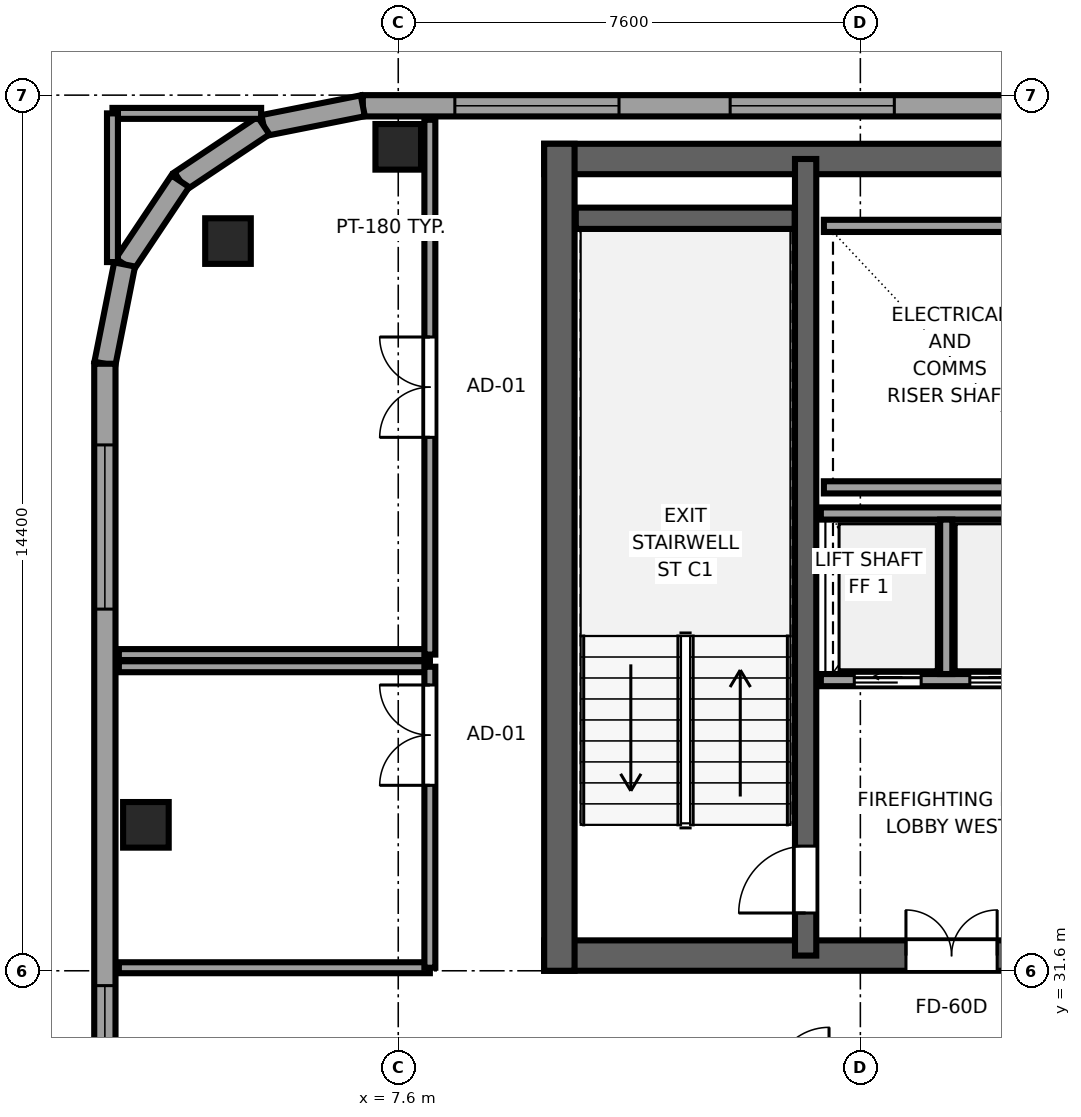
"""IFC4 building model, lengths in metres.
Left out: names, types, materials, properties, quantities, classifications, styles, units other than length and angle.
Written with IfcOpenShell. Run it as: python <this file> out.ifc"""

import sys

from ifc_helpers import new_model, si_unit, direction, frame, frame_2d, origin, origin_2d, place, context, subcontext, project, spatial, rectangle, extrude, source, transform, mapped, element, fill, save


model = new_model("IFC4")
c1 = context("Model", 3, precision=1e-05, world=origin(), true_north=direction((0.0, 1.0)))
c2 = subcontext(c1, "Body", "Model", "MODEL_VIEW")
j1 = project(units=[si_unit("LENGTHUNIT", "METRE"), si_unit("PLANEANGLEUNIT", "RADIAN")], contexts=[c1])
p1 = place(None, origin())
s1 = spatial("IfcSite", under=j1, at=p1, CompositionType="ELEMENT")
p2 = place(p1, origin())
s2 = spatial("IfcBuilding", under=s1, at=p2, CompositionType="ELEMENT")
p3 = place(p2, frame((0.0, 0.0, 234.55)))
s3 = spatial("IfcBuildingStorey", under=s2, at=p3, CompositionType="ELEMENT", Elevation=234.55)
p4 = place(p3, frame((10.0, 31.85, 0.0), z_axis=(0.0, 0.0, 1.0), x_axis=(1.0, 0.0, 0.0)))
e1 = element("IfcWall", 1, at=p4, inside=s3, PredefinedType="SHEAR", context=c2, shape_type="SweptSolid", body=[
    extrude(rectangle(XDim=26.0, YDim=0.5, at=frame_2d((13.0, 0.0))), origin(), (0.0, 0.0, 1.0), 3.55),
])
p5 = place(p4, frame((7.45, 0.0, 0.0), z_axis=(0.0, 0.0, 1.0), x_axis=(-1.0, 0.0, 0.0)))
e2 = element("IfcOpeningElement", 2, at=p5, cuts=e1, PredefinedType="OPENING", context=c2, shape_type="SweptSolid", body=[
    extrude(rectangle(XDim=1.5, YDim=2.04, at=frame_2d((0.75, 1.02))), frame((0.0, 0.26, 0.0), z_axis=(0.0, -1.0, 0.0), x_axis=(1.0, 0.0, 0.0)), (0.0, 0.0, 1.0), 0.52),
])
p6 = place(p4, frame((13.75, 0.0, 0.0), z_axis=(0.0, 0.0, 1.0), x_axis=(-1.0, 0.0, 0.0)))
e3 = element("IfcOpeningElement", 3, at=p6, cuts=e1, PredefinedType="OPENING", context=c2, shape_type="SweptSolid", body=[
    extrude(rectangle(XDim=1.5, YDim=2.04, at=frame_2d((0.75, 1.02))), frame((0.0, 0.26, 0.0), z_axis=(0.0, -1.0, 0.0), x_axis=(1.0, 0.0, 0.0)), (0.0, 0.0, 1.0), 0.52),
])
p7 = place(p4, frame((20.05, 0.0, 0.0), z_axis=(0.0, 0.0, 1.0), x_axis=(-1.0, 0.0, 0.0)))
e4 = element("IfcOpeningElement", 4, at=p7, cuts=e1, PredefinedType="OPENING", context=c2, shape_type="SweptSolid", body=[
    extrude(rectangle(XDim=1.5, YDim=2.04, at=frame_2d((0.75, 1.02))), frame((0.0, 0.26, 0.0), z_axis=(0.0, -1.0, 0.0), x_axis=(1.0, 0.0, 0.0)), (0.0, 0.0, 1.0), 0.52),
])
p8 = place(p3, frame((10.0, 44.95, 0.0), z_axis=(0.0, 0.0, 1.0), x_axis=(1.0, 0.0, 0.0)))
e5 = element("IfcWall", 5, at=p8, inside=s3, PredefinedType="SHEAR", context=c2, shape_type="SweptSolid", body=[
    extrude(rectangle(XDim=26.0, YDim=0.5, at=frame_2d((13.0, 0.0))), origin(), (0.0, 0.0, 1.0), 3.55),
])
p9 = place(p3, frame((10.25, 31.6, 0.0), z_axis=(0.0, 0.0, 1.0), x_axis=(0.0, 1.0, 0.0)))
e6 = element("IfcWall", 6, at=p9, inside=s3, PredefinedType="SHEAR", context=c2, shape_type="SweptSolid", body=[
    extrude(rectangle(XDim=13.6, YDim=0.5, at=frame_2d((6.8, 0.0))), origin(), (0.0, 0.0, 1.0), 3.55),
])
p10 = place(p3, frame((14.3, 31.85, 0.0), z_axis=(0.0, 0.0, 1.0), x_axis=(0.0, 1.0, 0.0)))
e7 = element("IfcWall", 7, at=p10, inside=s3, PredefinedType="SHEAR", context=c2, shape_type="SweptSolid", body=[
    extrude(rectangle(XDim=13.1, YDim=0.35, at=frame_2d((6.55, 0.0))), origin(), (0.0, 0.0, 1.0), 3.55),
])
p11 = place(p10, frame((0.7, 0.0, 0.0)))
e8 = element("IfcOpeningElement", 8, at=p11, cuts=e7, PredefinedType="OPENING", context=c2, shape_type="SweptSolid", body=[
    extrude(rectangle(XDim=1.1, YDim=2.12, at=frame_2d((0.55, 1.06))), frame((0.0, 0.185, 0.0), z_axis=(0.0, -1.0, 0.0), x_axis=(1.0, 0.0, 0.0)), (0.0, 0.0, 1.0), 0.37),
])
p12 = place(p3, frame((10.52, 43.975, 0.0), z_axis=(0.0, 0.0, 1.0), x_axis=(1.0, 0.0, 0.0)))
e9 = element("IfcWall", 9, at=p12, inside=s3, PredefinedType="SHEAR", context=c2, shape_type="SweptSolid", body=[
    extrude(rectangle(XDim=3.6, YDim=0.35, at=frame_2d((1.8, 0.0))), origin(), (0.0, 0.0, 1.0), 3.55),
])
m1 = source(origin(), c2, "Body", "SweptSolid", [
    extrude(rectangle(XDim=0.75, YDim=0.75, at=origin_2d()), origin(), (0.0, 0.0, 1.0), 3.55),
])
for number, where, z_axis, x_axis in (
    (10, (4.8, 43.6, 0.0), (0.0, 0.0, 1.0), (1.0, 0.0, 0.0)),
    (11, (7.6, 45.15, 0.0), (0.0, 0.0, 1.0), (1.0, 0.0, 0.0)),
    (12, (3.45, 34.0, 0.0), (0.0, 0.0, 1.0), (1.0, 0.0, 0.0)),
):
    element("IfcColumn", number, at=place(p3, frame(where, z_axis=z_axis, x_axis=x_axis)), inside=s3, PredefinedType="COLUMN", context=c2, shape_type="MappedRepresentation", body=[
        mapped(m1, transform((0.0, 0.0, 0.0), x_axis=(1.0, 0.0, 0.0), y_axis=(0.0, 1.0, 0.0), z_axis=(0.0, 0.0, 1.0), scale=1.0)),
    ])
p13 = place(p3, frame((35.383, 45.825, 0.0), z_axis=(0.0, 0.0, 1.0), x_axis=(-1.0, 0.0, 0.0)))
e13 = element("IfcWall", 13, at=p13, inside=s3, PredefinedType="SOLIDWALL", context=c2, shape_type="SweptSolid", body=[
    extrude(rectangle(XDim=28.366, YDim=0.35, at=frame_2d((14.183, 0.0))), origin(), (0.0, 0.0, 1.0), 3.37),
])
p14 = place(p13, frame((1.514, 0.0, 0.68)))
e14 = element("IfcOpeningElement", 14, at=p14, cuts=e13, PredefinedType="OPENING", context=c2, shape_type="SweptSolid", body=[
    extrude(rectangle(XDim=2.7, YDim=1.95, at=frame_2d((1.35, 0.975))), frame((0.0, 0.185, 0.0), z_axis=(0.0, -1.0, 0.0), x_axis=(1.0, 0.0, 0.0)), (0.0, 0.0, 1.0), 0.37),
])
p15 = place(p13, frame((6.041, 0.0, 0.68)))
e15 = element("IfcOpeningElement", 15, at=p15, cuts=e13, PredefinedType="OPENING", context=c2, shape_type="SweptSolid", body=[
    extrude(rectangle(XDim=2.7, YDim=1.95, at=frame_2d((1.35, 0.975))), frame((0.0, 0.185, 0.0), z_axis=(0.0, -1.0, 0.0), x_axis=(1.0, 0.0, 0.0)), (0.0, 0.0, 1.0), 0.37),
])
p16 = place(p13, frame((10.569, 0.0, 0.68)))
e16 = element("IfcOpeningElement", 16, at=p16, cuts=e13, PredefinedType="OPENING", context=c2, shape_type="SweptSolid", body=[
    extrude(rectangle(XDim=2.7, YDim=1.95, at=frame_2d((1.35, 0.975))), frame((0.0, 0.185, 0.0), z_axis=(0.0, -1.0, 0.0), x_axis=(1.0, 0.0, 0.0)), (0.0, 0.0, 1.0), 0.37),
])
p17 = place(p13, frame((15.097, 0.0, 0.68)))
e17 = element("IfcOpeningElement", 17, at=p17, cuts=e13, PredefinedType="OPENING", context=c2, shape_type="SweptSolid", body=[
    extrude(rectangle(XDim=2.7, YDim=1.95, at=frame_2d((1.35, 0.975))), frame((0.0, 0.185, 0.0), z_axis=(0.0, -1.0, 0.0), x_axis=(1.0, 0.0, 0.0)), (0.0, 0.0, 1.0), 0.37),
])
p18 = place(p13, frame((19.624, 0.0, 0.68)))
e18 = element("IfcOpeningElement", 18, at=p18, cuts=e13, PredefinedType="OPENING", context=c2, shape_type="SweptSolid", body=[
    extrude(rectangle(XDim=2.7, YDim=1.95, at=frame_2d((1.35, 0.975))), frame((0.0, 0.185, 0.0), z_axis=(0.0, -1.0, 0.0), x_axis=(1.0, 0.0, 0.0)), (0.0, 0.0, 1.0), 0.37),
])
p19 = place(p13, frame((24.152, 0.0, 0.68)))
e19 = element("IfcOpeningElement", 19, at=p19, cuts=e13, PredefinedType="OPENING", context=c2, shape_type="SweptSolid", body=[
    extrude(rectangle(XDim=2.7, YDim=1.95, at=frame_2d((1.35, 0.975))), frame((0.0, 0.185, 0.0), z_axis=(0.0, -1.0, 0.0), x_axis=(1.0, 0.0, 0.0)), (0.0, 0.0, 1.0), 0.37),
])
p20 = place(p3, frame((7.017, 45.825, 0.0), z_axis=(0.0, 0.0, 1.0), x_axis=(-0.980788844421, -0.195072403631, 0.0)))
e20 = element("IfcWall", 20, at=p20, inside=s3, PredefinedType="SOLIDWALL", context=c2, shape_type="SweptSolid", body=[
    extrude(rectangle(XDim=1.665, YDim=0.35, at=frame_2d((0.832, 0.0))), origin(), (0.0, 0.0, 1.0), 3.37),
])
for number, where, z_axis, x_axis in (
    (21, (5.385, 45.5, 0.0), (0.0, 0.0, 1.0), (-0.832, -0.556, 0.0)),
    (22, (4.015, 44.585, 0.0), (0.0, 0.0, 1.0), (-0.556, -0.831, 0.0)),
):
    element("IfcWall", number, at=place(p3, frame(where, z_axis=z_axis, x_axis=x_axis)), inside=s3, PredefinedType="SOLIDWALL", context=c2, shape_type="SweptSolid", body=[
        extrude(rectangle(XDim=1.647, YDim=0.35, at=frame_2d((0.824, 0.0))), origin(), (0.0, 0.0, 1.0), 2.9),
    ])
p21 = place(p3, frame((3.1, 43.216, 0.0), z_axis=(0.0, 0.0, 1.0), x_axis=(-0.195044345786, -0.980794424524, 0.0)))
e23 = element("IfcWall", 23, at=p21, inside=s3, PredefinedType="SOLIDWALL", context=c2, shape_type="SweptSolid", body=[
    extrude(rectangle(XDim=1.665, YDim=0.35, at=frame_2d((0.833, 0.0))), origin(), (0.0, 0.0, 1.0), 3.37),
])
p22 = place(p3, frame((2.775, 41.583, 0.0), z_axis=(0.0, 0.0, 1.0), x_axis=(0.0, -1.0, 0.0)))
e24 = element("IfcWall", 24, at=p22, inside=s3, PredefinedType="SOLIDWALL", context=c2, shape_type="SweptSolid", body=[
    extrude(rectangle(XDim=34.566, YDim=0.35, at=frame_2d((17.283, 0.0))), origin(), (0.0, 0.0, 1.0), 3.37),
])
p23 = place(p22, frame((1.335, 0.0, 0.68)))
e25 = element("IfcOpeningElement", 25, at=p23, cuts=e24, PredefinedType="OPENING", context=c2, shape_type="SweptSolid", body=[
    extrude(rectangle(XDim=2.7, YDim=1.95, at=frame_2d((1.35, 0.975))), frame((0.0, 0.185, 0.0), z_axis=(0.0, -1.0, 0.0), x_axis=(1.0, 0.0, 0.0)), (0.0, 0.0, 1.0), 0.37),
])
p24 = place(p22, frame((10.227, 0.0, 0.68)))
e26 = element("IfcOpeningElement", 26, at=p24, cuts=e24, PredefinedType="OPENING", context=c2, shape_type="SweptSolid", body=[
    extrude(rectangle(XDim=2.7, YDim=1.95, at=frame_2d((1.35, 0.975))), frame((0.0, 0.185, 0.0), z_axis=(0.0, -1.0, 0.0), x_axis=(1.0, 0.0, 0.0)), (0.0, 0.0, 1.0), 0.37),
])
p25 = place(p22, frame((13.847, 0.0, 0.68)))
e27 = element("IfcOpeningElement", 27, at=p25, cuts=e24, PredefinedType="OPENING", context=c2, shape_type="SweptSolid", body=[
    extrude(rectangle(XDim=2.7, YDim=1.95, at=frame_2d((1.35, 0.975))), frame((0.0, 0.185, 0.0), z_axis=(0.0, -1.0, 0.0), x_axis=(1.0, 0.0, 0.0)), (0.0, 0.0, 1.0), 0.37),
])
p26 = place(p22, frame((18.568, 0.0, 0.68)))
e28 = element("IfcOpeningElement", 28, at=p26, cuts=e24, PredefinedType="OPENING", context=c2, shape_type="SweptSolid", body=[
    extrude(rectangle(XDim=2.7, YDim=1.95, at=frame_2d((1.35, 0.975))), frame((0.0, 0.185, 0.0), z_axis=(0.0, -1.0, 0.0), x_axis=(1.0, 0.0, 0.0)), (0.0, 0.0, 1.0), 0.37),
])
p27 = place(p22, frame((26.36, 0.0, 0.68)))
e29 = element("IfcOpeningElement", 29, at=p27, cuts=e24, PredefinedType="OPENING", context=c2, shape_type="SweptSolid", body=[
    extrude(rectangle(XDim=2.7, YDim=1.95, at=frame_2d((1.35, 0.975))), frame((0.0, 0.185, 0.0), z_axis=(0.0, -1.0, 0.0), x_axis=(1.0, 0.0, 0.0)), (0.0, 0.0, 1.0), 0.37),
])
for number, where, z_axis, x_axis in (
    (30, (14.6, 39.55, 0.0), (0.0, 0.0, 1.0), (1.0, 0.0, 0.0)),
    (31, (14.6, 43.85, 0.0), (0.0, 0.0, 1.0), (1.0, 0.0, 0.0)),
):
    element("IfcWall", number, at=place(p3, frame(where, z_axis=z_axis, x_axis=x_axis)), inside=s3, PredefinedType="SOLIDWALL", context=c2, shape_type="SweptSolid", body=[
        extrude(rectangle(XDim=4.1, YDim=0.2, at=frame_2d((2.05, 0.0))), origin(), (0.0, 0.0, 1.0), 3.37),
    ])
p28 = place(p3, frame((14.55, 36.38, 0.0), z_axis=(0.0, 0.0, 1.0), x_axis=(1.0, 0.0, 0.0)))
e32 = element("IfcWall", 32, at=p28, inside=s3, PredefinedType="SOLIDWALL", context=c2, shape_type="SweptSolid", body=[
    extrude(rectangle(XDim=4.075, YDim=0.2, at=frame_2d((2.038, 0.0))), origin(), (0.0, 0.0, 1.0), 3.37),
])
p29 = place(p28, frame((0.55, 0.0, 0.0)))
e33 = element("IfcOpeningElement", 33, at=p29, cuts=e32, PredefinedType="OPENING", context=c2, shape_type="SweptSolid", body=[
    extrude(rectangle(XDim=1.1, YDim=2.12, at=frame_2d((0.55, 1.06))), frame((0.0, 0.11, 0.0), z_axis=(0.0, -1.0, 0.0), x_axis=(1.0, 0.0, 0.0)), (0.0, 0.0, 1.0), 0.22),
])
p30 = place(p28, frame((2.45, 0.0, 0.0)))
e34 = element("IfcOpeningElement", 34, at=p30, cuts=e32, PredefinedType="OPENING", context=c2, shape_type="SweptSolid", body=[
    extrude(rectangle(XDim=1.1, YDim=2.12, at=frame_2d((0.55, 1.06))), frame((0.0, 0.11, 0.0), z_axis=(0.0, -1.0, 0.0), x_axis=(1.0, 0.0, 0.0)), (0.0, 0.0, 1.0), 0.22),
])
p31 = place(p3, frame((14.55, 39.12, 0.0), z_axis=(0.0, 0.0, 1.0), x_axis=(1.0, 0.0, 0.0)))
e35 = element("IfcWall", 35, at=p31, inside=s3, PredefinedType="SOLIDWALL", context=c2, shape_type="SweptSolid", body=[
    extrude(rectangle(XDim=4.075, YDim=0.2, at=frame_2d((2.038, 0.0))), origin(), (0.0, 0.0, 1.0), 3.37),
])
p32 = place(p3, frame((16.613, 36.48, 0.0), z_axis=(0.0, 0.0, 1.0), x_axis=(0.0, 1.0, 0.0)))
e36 = element("IfcWall", 36, at=p32, inside=s3, PredefinedType="SOLIDWALL", context=c2, shape_type="SweptSolid", body=[
    extrude(rectangle(XDim=2.54, YDim=0.2, at=frame_2d((1.27, 0.0))), origin(), (0.0, 0.0, 1.0), 3.37),
])
for number, where, z_axis, x_axis in (
    (37, (3.005, 31.65, 0.0), (0.0, 0.0, 1.0), (1.0, 0.0, 0.0)),
    (38, (3.005, 36.6, 0.0), (0.0, 0.0, 1.0), (1.0, 0.0, 0.0)),
):
    element("IfcWall", number, at=place(p3, frame(where, z_axis=z_axis, x_axis=x_axis)), inside=s3, PredefinedType="PARTITIONING", context=c2, shape_type="SweptSolid", body=[
        extrude(rectangle(XDim=5.115, YDim=0.18, at=frame_2d((2.558, 0.0))), origin(), (0.0, 0.0, 1.0), 3.37),
    ])
p33 = place(p3, frame((8.12, 31.65, 0.0), z_axis=(0.0, 0.0, 1.0), x_axis=(0.0, 1.0, 0.0)))
e39 = element("IfcWall", 39, at=p33, inside=s3, PredefinedType="PARTITIONING", context=c2, shape_type="SweptSolid", body=[
    extrude(rectangle(XDim=4.95, YDim=0.18, at=frame_2d((2.475, 0.0))), origin(), (0.0, 0.0, 1.0), 3.37),
])
p34 = place(p33, frame((3.0, 0.0, 0.0)))
e40 = element("IfcOpeningElement", 40, at=p34, cuts=e39, PredefinedType="OPENING", context=c2, shape_type="SweptSolid", body=[
    extrude(rectangle(XDim=1.65, YDim=2.15, at=frame_2d((0.825, 1.075))), frame((0.0, 0.1, 0.0), z_axis=(0.0, -1.0, 0.0), x_axis=(1.0, 0.0, 0.0)), (0.0, 0.0, 1.0), 0.2),
])
p35 = place(p3, frame((3.005, 36.8, 0.0), z_axis=(0.0, 0.0, 1.0), x_axis=(1.0, 0.0, 0.0)))
e41 = element("IfcWall", 41, at=p35, inside=s3, PredefinedType="PARTITIONING", context=c2, shape_type="SweptSolid", body=[
    extrude(rectangle(XDim=5.115, YDim=0.18, at=frame_2d((2.558, 0.0))), origin(), (0.0, 0.0, 1.0), 3.37),
])
for number, where, z_axis, x_axis in (
    (42, (2.9, 45.7, 0.0), (0.0, 0.0, 1.0), (1.0, 0.0, 0.0)),
    (43, (2.9, 43.255, 0.0), (0.0, 0.0, 1.0), (0.0, 1.0, 0.0)),
):
    element("IfcWall", number, at=place(p3, frame(where, z_axis=z_axis, x_axis=x_axis)), inside=s3, PredefinedType="PARTITIONING", context=c2, shape_type="SweptSolid", body=[
        extrude(rectangle(XDim=2.445, YDim=0.18, at=frame_2d((1.223, 0.0))), origin(), (0.0, 0.0, 1.0), 3.37),
    ])
p36 = place(p3, frame((8.12, 36.8, 0.0), z_axis=(0.0, 0.0, 1.0), x_axis=(0.0, 1.0, 0.0)))
e44 = element("IfcWall", 44, at=p36, inside=s3, PredefinedType="PARTITIONING", context=c2, shape_type="SweptSolid", body=[
    extrude(rectangle(XDim=8.795, YDim=0.18, at=frame_2d((4.397, 0.0))), origin(), (0.0, 0.0, 1.0), 3.37),
])
p37 = place(p36, frame((3.573, 0.0, 0.0)))
e45 = element("IfcOpeningElement", 45, at=p37, cuts=e44, PredefinedType="OPENING", context=c2, shape_type="SweptSolid", body=[
    extrude(rectangle(XDim=1.65, YDim=2.15, at=frame_2d((0.825, 1.075))), frame((0.0, 0.1, 0.0), z_axis=(0.0, -1.0, 0.0), x_axis=(1.0, 0.0, 0.0)), (0.0, 0.0, 1.0), 0.2),
])
m2 = source(origin(), c2, "Body", "SweptSolid", [
    extrude(rectangle(XDim=2.7, YDim=1.95, at=frame_2d((1.35, 0.975))), frame((0.0, 0.09, 0.0), z_axis=(0.0, -1.0, 0.0), x_axis=(1.0, 0.0, 0.0)), (0.0, 0.0, 1.0), 0.06),
])
p38 = place(p18, origin())
e46 = element("IfcWindow", 46, at=p38, inside=s3, PartitioningType="TRIPLE_PANEL_HORIZONTAL", PredefinedType="WINDOW", context=c2, shape_type="MappedRepresentation", body=[
    mapped(m2, transform((0.0, 0.0, 0.0), x_axis=(1.0, 0.0, 0.0), y_axis=(0.0, 1.0, 0.0), z_axis=(0.0, 0.0, 1.0), scale=1.0)),
])
fill(e18, e46)
p39 = place(p19, origin())
e47 = element("IfcWindow", 47, at=p39, inside=s3, PartitioningType="TRIPLE_PANEL_HORIZONTAL", PredefinedType="WINDOW", context=c2, shape_type="MappedRepresentation", body=[
    mapped(m2, transform((0.0, 0.0, 0.0), x_axis=(1.0, 0.0, 0.0), y_axis=(0.0, 1.0, 0.0), z_axis=(0.0, 0.0, 1.0), scale=1.0)),
])
fill(e19, e47)
p40 = place(p23, origin())
e48 = element("IfcWindow", 48, at=p40, inside=s3, PartitioningType="TRIPLE_PANEL_HORIZONTAL", PredefinedType="WINDOW", context=c2, shape_type="MappedRepresentation", body=[
    mapped(m2, transform((0.0, 0.0, 0.0), x_axis=(1.0, 0.0, 0.0), y_axis=(0.0, 1.0, 0.0), z_axis=(0.0, 0.0, 1.0), scale=1.0)),
])
fill(e25, e48)
p41 = place(p24, origin())
e49 = element("IfcWindow", 49, at=p41, inside=s3, PartitioningType="TRIPLE_PANEL_HORIZONTAL", PredefinedType="WINDOW", context=c2, shape_type="MappedRepresentation", body=[
    mapped(m2, transform((0.0, 0.0, 0.0), x_axis=(1.0, 0.0, 0.0), y_axis=(0.0, 1.0, 0.0), z_axis=(0.0, 0.0, 1.0), scale=1.0)),
])
fill(e26, e49)
m3 = source(origin(), c2, "Body", "SweptSolid", [
    extrude(rectangle(XDim=1.1, YDim=2.12, at=frame_2d((0.55, 1.06))), frame((0.0, 0.025, 0.0), z_axis=(0.0, -1.0, 0.0), x_axis=(1.0, 0.0, 0.0)), (0.0, 0.0, 1.0), 0.05),
])
p42 = place(p11, origin())
e50 = element("IfcDoor", 50, at=p42, inside=s3, OperationType="SINGLE_SWING_LEFT", PredefinedType="DOOR", context=c2, shape_type="MappedRepresentation", body=[
    mapped(m3, transform((0.0, 0.0, 0.0), x_axis=(1.0, 0.0, 0.0), y_axis=(0.0, 1.0, 0.0), z_axis=(0.0, 0.0, 1.0), scale=1.0)),
])
fill(e8, e50)
m4 = source(origin(), c2, "Body", "SweptSolid", [
    extrude(rectangle(XDim=1.5, YDim=2.04, at=frame_2d((0.75, 1.02))), frame((0.0, 0.025, 0.0), z_axis=(0.0, -1.0, 0.0), x_axis=(1.0, 0.0, 0.0)), (0.0, 0.0, 1.0), 0.05),
])
p43 = place(p5, origin())
e51 = element("IfcDoor", 51, at=p43, inside=s3, OperationType="DOUBLE_DOOR_SINGLE_SWING", PredefinedType="DOOR", context=c2, shape_type="MappedRepresentation", body=[
    mapped(m4, transform((0.0, 0.0, 0.0), x_axis=(1.0, 0.0, 0.0), y_axis=(0.0, 1.0, 0.0), z_axis=(0.0, 0.0, 1.0), scale=1.0)),
])
fill(e2, e51)
m5 = source(origin(), c2, "Body", "SweptSolid", [
    extrude(rectangle(XDim=1.1, YDim=2.12, at=frame_2d((0.55, 1.06))), frame((0.0, 0.025, 0.0), z_axis=(0.0, -1.0, 0.0), x_axis=(1.0, 0.0, 0.0)), (0.0, 0.0, 1.0), 0.05),
])
p44 = place(p29, origin())
e52 = element("IfcDoor", 52, at=p44, inside=s3, OperationType="SLIDING_TO_LEFT", PredefinedType="DOOR", context=c2, shape_type="MappedRepresentation", body=[
    mapped(m5, transform((0.0, 0.0, 0.0), x_axis=(1.0, 0.0, 0.0), y_axis=(0.0, 1.0, 0.0), z_axis=(0.0, 0.0, 1.0), scale=1.0)),
])
fill(e33, e52)
p45 = place(p30, origin())
e53 = element("IfcDoor", 53, at=p45, inside=s3, OperationType="SLIDING_TO_RIGHT", PredefinedType="DOOR", context=c2, shape_type="MappedRepresentation", body=[
    mapped(m5, transform((0.0, 0.0, 0.0), x_axis=(1.0, 0.0, 0.0), y_axis=(0.0, 1.0, 0.0), z_axis=(0.0, 0.0, 1.0), scale=1.0)),
])
fill(e34, e53)
m6 = source(origin(), c2, "Body", "SweptSolid", [
    extrude(rectangle(XDim=1.65, YDim=2.15, at=frame_2d((0.825, 1.075))), frame((0.0, 0.025, 0.0), z_axis=(0.0, -1.0, 0.0), x_axis=(1.0, 0.0, 0.0)), (0.0, 0.0, 1.0), 0.05),
])
p46 = place(p34, origin())
e54 = element("IfcDoor", 54, at=p46, inside=s3, OperationType="DOUBLE_DOOR_SINGLE_SWING", PredefinedType="DOOR", context=c2, shape_type="MappedRepresentation", body=[
    mapped(m6, transform((0.0, 0.0, 0.0), x_axis=(1.0, 0.0, 0.0), y_axis=(0.0, 1.0, 0.0), z_axis=(0.0, 0.0, 1.0), scale=1.0)),
])
fill(e40, e54)
p47 = place(p37, origin())
e55 = element("IfcDoor", 55, at=p47, inside=s3, OperationType="DOUBLE_DOOR_SINGLE_SWING", PredefinedType="DOOR", context=c2, shape_type="MappedRepresentation", body=[
    mapped(m6, transform((0.0, 0.0, 0.0), x_axis=(1.0, 0.0, 0.0), y_axis=(0.0, 1.0, 0.0), z_axis=(0.0, 0.0, 1.0), scale=1.0)),
])
fill(e45, e55)
save(model, sys.argv[1])
